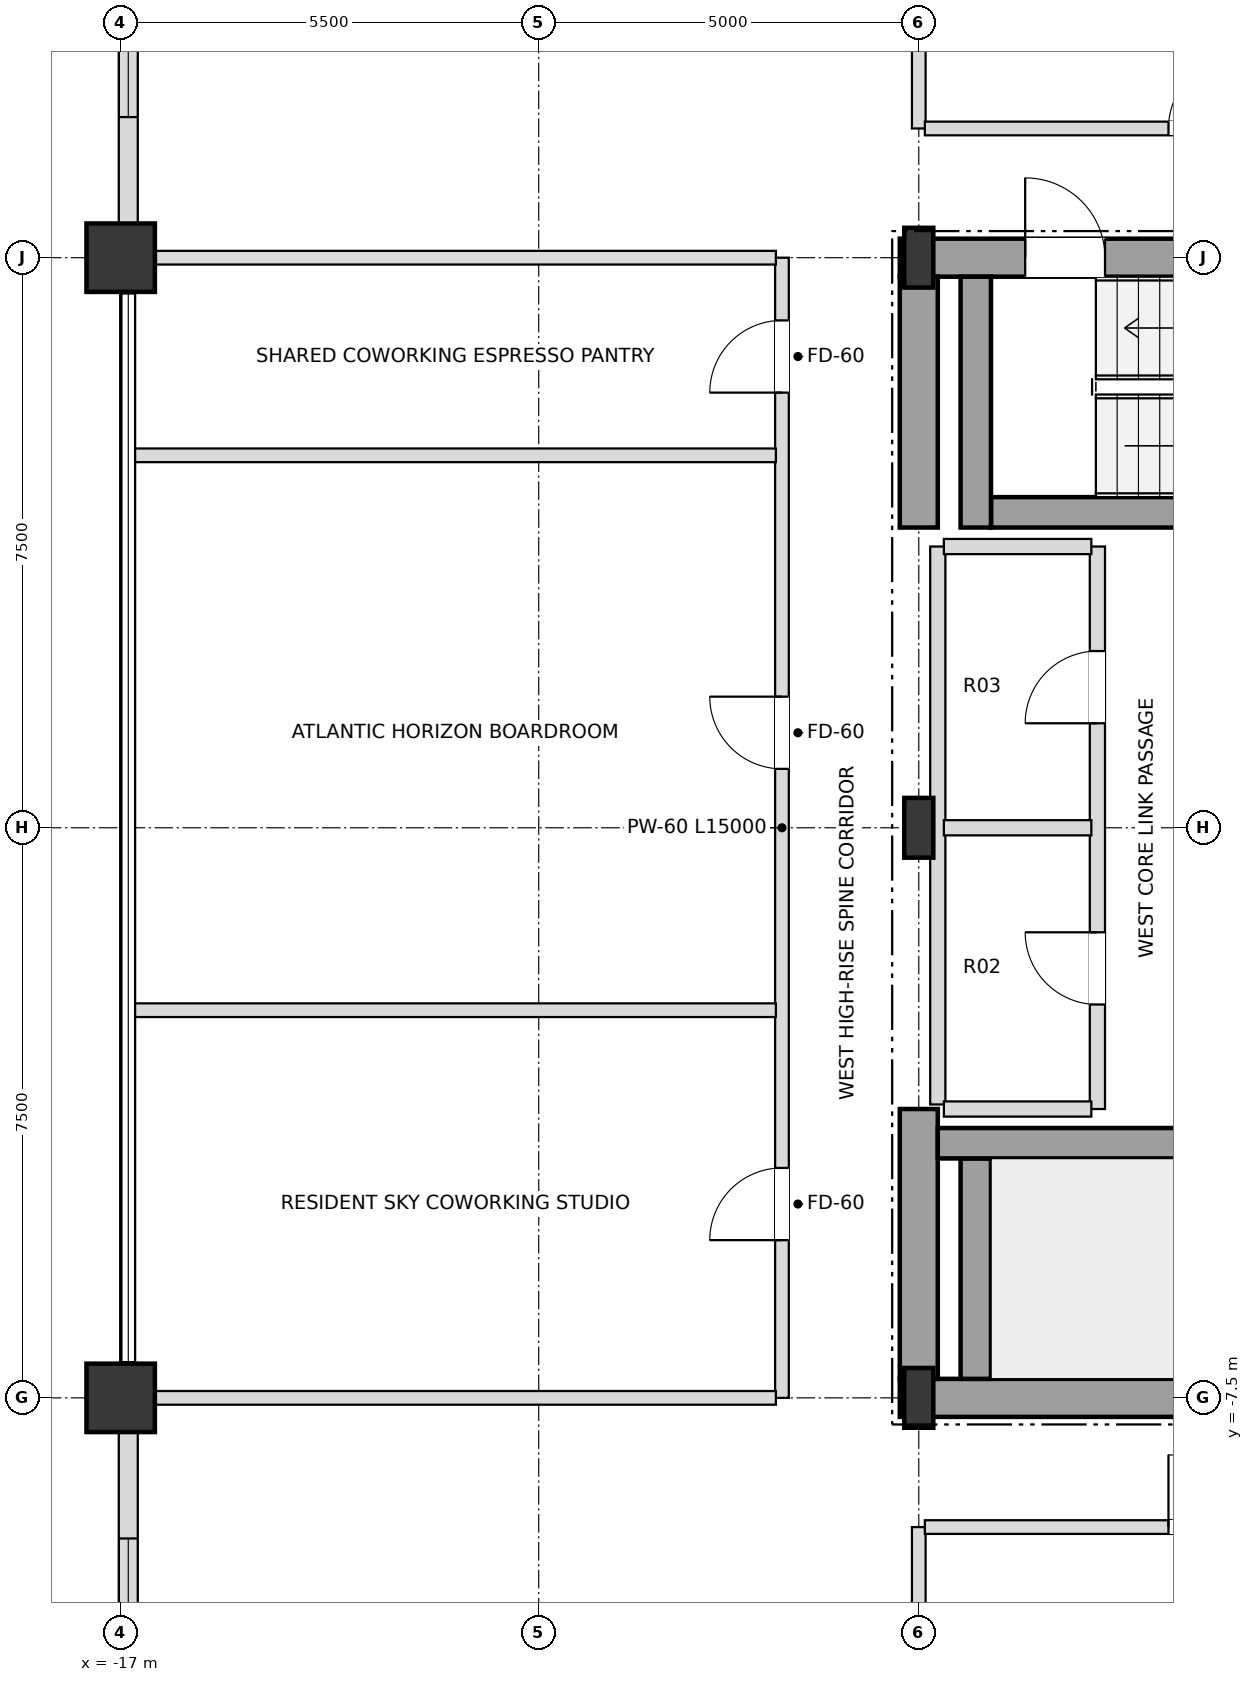
"""IFC4 building model, lengths in metres.
Left out: names, types, materials, properties, quantities, classifications, styles, units other than length and angle.
Written with IfcOpenShell. Run it as: python <this file> out.ifc"""

import sys

from ifc_helpers import new_model, si_unit, direction, frame, frame_2d, origin, origin_2d, place, context, subcontext, project, spatial, rectangle, i_section, extrude, element, fill, save


model = new_model("IFC4")
c1 = context("Model", 3, precision=1e-05, world=origin(), true_north=direction((0.0, 1.0)))
c2 = subcontext(c1, "Body", "Model", "MODEL_VIEW")
j1 = project(units=[si_unit("LENGTHUNIT", "METRE"), si_unit("PLANEANGLEUNIT", "RADIAN")], contexts=[c1])
p1 = place(None, origin())
s1 = spatial("IfcSite", under=j1, at=p1, CompositionType="ELEMENT")
p2 = place(p1, origin())
s2 = spatial("IfcBuilding", under=s1, at=p2, CompositionType="ELEMENT")
p3 = place(p2, frame((0.0, 0.0, 258.3)))
s3 = spatial("IfcBuildingStorey", under=s2, at=p3, CompositionType="ELEMENT", Elevation=258.3)
for number, where, z_axis, x_axis in (
    (1, (-6.5, -7.5, 0.0), (0.0, 0.0, 1.0), (1.0, 0.0, 0.0)),
    (2, (-6.5, 0.0, 0.0), (0.0, 0.0, 1.0), (1.0, 0.0, 0.0)),
    (3, (-6.5, 7.5, 0.0), (0.0, 0.0, 1.0), (1.0, 0.0, 0.0)),
):
    element("IfcColumn", number, at=place(p3, frame(where, z_axis=z_axis, x_axis=x_axis)), inside=s3, PredefinedType="COLUMN", context=c2, shape_type="SweptSolid", body=[
        extrude(i_section(OverallWidth=0.382, OverallDepth=0.786, WebThickness=0.02, FlangeThickness=0.033, at=origin_2d()), origin(), (0.0, 0.0, 1.0), 3.6),
    ])
for number, where, z_axis, x_axis in (
    (4, (-17.0, 7.5, 0.0), (0.0, 0.0, 1.0), (1.0, 0.0, 0.0)),
    (5, (-17.0, -7.5, 0.0), (0.0, 0.0, 1.0), (1.0, 0.0, 0.0)),
):
    element("IfcColumn", number, at=place(p3, frame(where, z_axis=z_axis, x_axis=x_axis)), inside=s3, PredefinedType="USERDEFINED", context=c2, shape_type="SweptSolid", body=[
        extrude(rectangle(XDim=0.9, YDim=0.9, at=origin_2d()), origin(), (0.0, 0.0, 1.0), 3.6),
    ])
p4 = place(p3, frame((-16.9, 12.555, 0.0), z_axis=(0.0, 0.0, 1.0), x_axis=(0.0, -1.0, 0.0)))
e6 = element("IfcWall", 6, at=p4, inside=s3, PredefinedType="SOLIDWALL", context=c2, shape_type="SweptSolid", body=[
    extrude(rectangle(XDim=4.61, YDim=0.25, at=frame_2d((2.305, 0.0))), origin(), (0.0, 0.0, 1.0), 2.748),
])
p5 = place(p4, frame((1.405, 0.0, 0.72)))
e7 = element("IfcOpeningElement", 7, at=p5, cuts=e6, PredefinedType="OPENING", context=c2, shape_type="SweptSolid", body=[
    extrude(rectangle(XDim=1.8, YDim=1.68, at=frame_2d((0.9, 0.84))), frame((0.0, 0.135, 0.0), z_axis=(0.0, -1.0, 0.0), x_axis=(1.0, 0.0, 0.0)), (0.0, 0.0, 1.0), 0.27),
])
p6 = place(p3, frame((-16.9, -7.945, 0.0), z_axis=(0.0, 0.0, 1.0), x_axis=(0.0, -1.0, 0.0)))
e8 = element("IfcWall", 8, at=p6, inside=s3, PredefinedType="SOLIDWALL", context=c2, shape_type="SweptSolid", body=[
    extrude(rectangle(XDim=4.61, YDim=0.25, at=frame_2d((2.305, 0.0))), origin(), (0.0, 0.0, 1.0), 2.748),
])
p7 = place(p6, frame((1.405, 0.0, 0.72)))
e9 = element("IfcOpeningElement", 9, at=p7, cuts=e8, PredefinedType="OPENING", context=c2, shape_type="SweptSolid", body=[
    extrude(rectangle(XDim=1.8, YDim=1.68, at=frame_2d((0.9, 0.84))), frame((0.0, 0.135, 0.0), z_axis=(0.0, -1.0, 0.0), x_axis=(1.0, 0.0, 0.0)), (0.0, 0.0, 1.0), 0.27),
])
p8 = place(p3, frame((-6.75, -7.5, 0.0), z_axis=(0.0, 0.0, 1.0), x_axis=(1.0, 0.0, 0.0)))
e10 = element("IfcWall", 10, at=p8, inside=s3, PredefinedType="SHEAR", context=c2, shape_type="SweptSolid", body=[
    extrude(rectangle(XDim=6.75, YDim=0.5, at=frame_2d((3.375, 0.0))), origin(), (0.0, 0.0, 1.0), 3.38),
])
p9 = place(p3, frame((-6.75, 7.5, 0.0), z_axis=(0.0, 0.0, 1.0), x_axis=(1.0, 0.0, 0.0)))
e11 = element("IfcWall", 11, at=p9, inside=s3, PredefinedType="SHEAR", context=c2, shape_type="SweptSolid", body=[
    extrude(rectangle(XDim=6.75, YDim=0.5, at=frame_2d((3.375, 0.0))), origin(), (0.0, 0.0, 1.0), 3.38),
])
p10 = place(p9, frame((1.65, 0.0, 0.0)))
e12 = element("IfcOpeningElement", 12, at=p10, cuts=e11, PredefinedType="OPENING", context=c2, shape_type="SweptSolid", body=[
    extrude(rectangle(XDim=1.05, YDim=2.15, at=frame_2d((0.525, 1.075))), frame((0.0, 0.26, 0.0), z_axis=(0.0, -1.0, 0.0), x_axis=(1.0, 0.0, 0.0)), (0.0, 0.0, 1.0), 0.52),
])
p11 = place(p3, frame((-6.5, -7.25, 0.0), z_axis=(0.0, 0.0, 1.0), x_axis=(0.0, 1.0, 0.0)))
e13 = element("IfcWall", 13, at=p11, inside=s3, PredefinedType="SHEAR", context=c2, shape_type="SweptSolid", body=[
    extrude(rectangle(XDim=3.55, YDim=0.5, at=frame_2d((1.775, 0.0))), origin(), (0.0, 0.0, 1.0), 3.38),
])
p12 = place(p3, frame((-6.5, 3.95, 0.0), z_axis=(0.0, 0.0, 1.0), x_axis=(0.0, 1.0, 0.0)))
e14 = element("IfcWall", 14, at=p12, inside=s3, PredefinedType="SHEAR", context=c2, shape_type="SweptSolid", body=[
    extrude(rectangle(XDim=3.3, YDim=0.5, at=frame_2d((1.65, 0.0))), origin(), (0.0, 0.0, 1.0), 3.38),
])
p13 = place(p3, frame((-5.75, -7.25, 0.0), z_axis=(0.0, 0.0, 1.0), x_axis=(0.0, 1.0, 0.0)))
e15 = element("IfcWall", 15, at=p13, inside=s3, PredefinedType="SHEAR", context=c2, shape_type="SweptSolid", body=[
    extrude(rectangle(XDim=2.9, YDim=0.4, at=frame_2d((1.45, 0.0))), origin(), (0.0, 0.0, 1.0), 3.38),
])
p14 = place(p3, frame((-6.25, -4.15, 0.0), z_axis=(0.0, 0.0, 1.0), x_axis=(1.0, 0.0, 0.0)))
e16 = element("IfcWall", 16, at=p14, inside=s3, PredefinedType="SHEAR", context=c2, shape_type="SweptSolid", body=[
    extrude(rectangle(XDim=7.78, YDim=0.4, at=frame_2d((3.89, 0.0))), origin(), (0.0, 0.0, 1.0), 3.38),
])
p15 = place(p3, frame((-5.55, 4.15, 0.0), z_axis=(0.0, 0.0, 1.0), x_axis=(1.0, 0.0, 0.0)))
e17 = element("IfcWall", 17, at=p15, inside=s3, PredefinedType="SHEAR", context=c2, shape_type="SweptSolid", body=[
    extrude(rectangle(XDim=7.08, YDim=0.4, at=frame_2d((3.54, 0.0))), origin(), (0.0, 0.0, 1.0), 3.38),
])
p16 = place(p3, frame((-5.75, 3.95, 0.0), z_axis=(0.0, 0.0, 1.0), x_axis=(0.0, 1.0, 0.0)))
e18 = element("IfcWall", 18, at=p16, inside=s3, PredefinedType="SHEAR", context=c2, shape_type="SweptSolid", body=[
    extrude(rectangle(XDim=3.3, YDim=0.4, at=frame_2d((1.65, 0.0))), origin(), (0.0, 0.0, 1.0), 3.38),
])
p17 = place(p3, frame((-8.3, -7.5, 0.0), z_axis=(0.0, 0.0, 1.0), x_axis=(0.0, 1.0, 0.0)))
e19 = element("IfcWall", 19, at=p17, inside=s3, PredefinedType="PARTITIONING", context=c2, shape_type="SweptSolid", body=[
    extrude(rectangle(XDim=15.0, YDim=0.18, at=frame_2d((7.5, 0.0))), origin(), (0.0, 0.0, 1.0), 3.38),
])
p18 = place(p17, frame((2.075, 0.0, 0.0)))
e20 = element("IfcOpeningElement", 20, at=p18, cuts=e19, PredefinedType="OPENING", context=c2, shape_type="SweptSolid", body=[
    extrude(rectangle(XDim=0.95, YDim=2.15, at=frame_2d((0.475, 1.075))), frame((0.0, 0.1, 0.0), z_axis=(0.0, -1.0, 0.0), x_axis=(1.0, 0.0, 0.0)), (0.0, 0.0, 1.0), 0.2),
])
p19 = place(p17, frame((8.275, 0.0, 0.0)))
e21 = element("IfcOpeningElement", 21, at=p19, cuts=e19, PredefinedType="OPENING", context=c2, shape_type="SweptSolid", body=[
    extrude(rectangle(XDim=0.95, YDim=2.15, at=frame_2d((0.475, 1.075))), frame((0.0, 0.1, 0.0), z_axis=(0.0, -1.0, 0.0), x_axis=(1.0, 0.0, 0.0)), (0.0, 0.0, 1.0), 0.2),
])
p20 = place(p17, frame((13.225, 0.0, 0.0)))
e22 = element("IfcOpeningElement", 22, at=p20, cuts=e19, PredefinedType="OPENING", context=c2, shape_type="SweptSolid", body=[
    extrude(rectangle(XDim=0.95, YDim=2.15, at=frame_2d((0.475, 1.075))), frame((0.0, 0.1, 0.0), z_axis=(0.0, -1.0, 0.0), x_axis=(1.0, 0.0, 0.0)), (0.0, 0.0, 1.0), 0.2),
])
for number, where, z_axis, x_axis in (
    (23, (-6.5, -19.9, 0.0), (0.0, 0.0, 1.0), (0.0, 1.0, 0.0)),
    (24, (-6.5, 9.2, 0.0), (0.0, 0.0, 1.0), (0.0, 1.0, 0.0)),
):
    element("IfcWall", number, at=place(p3, frame(where, z_axis=z_axis, x_axis=x_axis)), inside=s3, PredefinedType="PARTITIONING", context=c2, shape_type="SweptSolid", body=[
        extrude(rectangle(XDim=10.7, YDim=0.18, at=frame_2d((5.35, 0.0))), origin(), (0.0, 0.0, 1.0), 2.826),
    ])
p21 = place(p3, frame((-6.25, -3.64, 0.0), z_axis=(0.0, 0.0, 1.0), x_axis=(0.0, 1.0, 0.0)))
e25 = element("IfcWall", 25, at=p21, inside=s3, PredefinedType="SOLIDWALL", context=c2, shape_type="SweptSolid", body=[
    extrude(rectangle(XDim=7.34, YDim=0.2, at=frame_2d((3.67, 0.0))), origin(), (0.0, 0.0, 1.0), 3.38),
])
p22 = place(p3, frame((-4.15, -3.7, 0.0), z_axis=(0.0, 0.0, 1.0), x_axis=(0.0, 1.0, 0.0)))
e26 = element("IfcWall", 26, at=p22, inside=s3, PredefinedType="SOLIDWALL", context=c2, shape_type="SweptSolid", body=[
    extrude(rectangle(XDim=7.4, YDim=0.2, at=frame_2d((3.7, 0.0))), origin(), (0.0, 0.0, 1.0), 3.38),
])
p23 = place(p22, frame((1.375, 0.0, 0.0)))
e27 = element("IfcOpeningElement", 27, at=p23, cuts=e26, PredefinedType="OPENING", context=c2, shape_type="SweptSolid", body=[
    extrude(rectangle(XDim=0.95, YDim=2.15, at=frame_2d((0.475, 1.075))), frame((0.0, 0.11, 0.0), z_axis=(0.0, -1.0, 0.0), x_axis=(1.0, 0.0, 0.0)), (0.0, 0.0, 1.0), 0.22),
])
p24 = place(p22, frame((5.075, 0.0, 0.0)))
e28 = element("IfcOpeningElement", 28, at=p24, cuts=e26, PredefinedType="OPENING", context=c2, shape_type="SweptSolid", body=[
    extrude(rectangle(XDim=0.95, YDim=2.15, at=frame_2d((0.475, 1.075))), frame((0.0, 0.11, 0.0), z_axis=(0.0, -1.0, 0.0), x_axis=(1.0, 0.0, 0.0)), (0.0, 0.0, 1.0), 0.22),
])
p25 = place(p3, frame((-6.42, -9.2, 0.0), z_axis=(0.0, 0.0, 1.0), x_axis=(1.0, 0.0, 0.0)))
e29 = element("IfcWall", 29, at=p25, inside=s3, PredefinedType="PARTITIONING", context=c2, shape_type="SweptSolid", body=[
    extrude(rectangle(XDim=7.34, YDim=0.18, at=frame_2d((3.67, 0.0))), origin(), (0.0, 0.0, 1.0), 3.38),
])
p26 = place(p25, frame((3.205, 0.0, 0.0)))
e30 = element("IfcOpeningElement", 30, at=p26, cuts=e29, PredefinedType="OPENING", context=c2, shape_type="SweptSolid", body=[
    extrude(rectangle(XDim=0.95, YDim=2.15, at=frame_2d((0.475, 1.075))), frame((0.0, 0.1, 0.0), z_axis=(0.0, -1.0, 0.0), x_axis=(1.0, 0.0, 0.0)), (0.0, 0.0, 1.0), 0.2),
])
p27 = place(p3, frame((-16.9, -7.5, 0.0), z_axis=(0.0, 0.0, 1.0), x_axis=(1.0, 0.0, 0.0)))
e31 = element("IfcWall", 31, at=p27, inside=s3, PredefinedType="PARTITIONING", context=c2, shape_type="SweptSolid", body=[
    extrude(rectangle(XDim=8.52, YDim=0.18, at=frame_2d((4.26, 0.0))), origin(), (0.0, 0.0, 1.0), 2.826),
])
p28 = place(p3, frame((-6.17, -3.7, 0.0), z_axis=(0.0, 0.0, 1.0), x_axis=(1.0, 0.0, 0.0)))
e32 = element("IfcWall", 32, at=p28, inside=s3, PredefinedType="SOLIDWALL", context=c2, shape_type="SweptSolid", body=[
    extrude(rectangle(XDim=1.94, YDim=0.2, at=frame_2d((0.97, 0.0))), origin(), (0.0, 0.0, 1.0), 3.38),
])
p29 = place(p3, frame((-16.82, -2.4, 0.0), z_axis=(0.0, 0.0, 1.0), x_axis=(1.0, 0.0, 0.0)))
e33 = element("IfcWall", 33, at=p29, inside=s3, PredefinedType="PARTITIONING", context=c2, shape_type="SweptSolid", body=[
    extrude(rectangle(XDim=8.44, YDim=0.18, at=frame_2d((4.22, 0.0))), origin(), (0.0, 0.0, 1.0), 3.018),
])
for number, where, z_axis, x_axis in (
    (34, (-6.17, 0.0, 0.0), (0.0, 0.0, 1.0), (1.0, 0.0, 0.0)),
    (35, (-6.17, 3.7, 0.0), (0.0, 0.0, 1.0), (1.0, 0.0, 0.0)),
):
    element("IfcWall", number, at=place(p3, frame(where, z_axis=z_axis, x_axis=x_axis)), inside=s3, PredefinedType="SOLIDWALL", context=c2, shape_type="SweptSolid", body=[
        extrude(rectangle(XDim=1.94, YDim=0.2, at=frame_2d((0.97, 0.0))), origin(), (0.0, 0.0, 1.0), 3.38),
    ])
p30 = place(p3, frame((-16.82, 4.9, 0.0), z_axis=(0.0, 0.0, 1.0), x_axis=(1.0, 0.0, 0.0)))
e36 = element("IfcWall", 36, at=p30, inside=s3, PredefinedType="PARTITIONING", context=c2, shape_type="SweptSolid", body=[
    extrude(rectangle(XDim=8.44, YDim=0.18, at=frame_2d((4.22, 0.0))), origin(), (0.0, 0.0, 1.0), 3.018),
])
p31 = place(p3, frame((-16.9, 7.5, 0.0), z_axis=(0.0, 0.0, 1.0), x_axis=(1.0, 0.0, 0.0)))
e37 = element("IfcWall", 37, at=p31, inside=s3, PredefinedType="PARTITIONING", context=c2, shape_type="SweptSolid", body=[
    extrude(rectangle(XDim=8.52, YDim=0.18, at=frame_2d((4.26, 0.0))), origin(), (0.0, 0.0, 1.0), 2.826),
])
p32 = place(p3, frame((-6.42, 9.2, 0.0), z_axis=(0.0, 0.0, 1.0), x_axis=(1.0, 0.0, 0.0)))
e38 = element("IfcWall", 38, at=p32, inside=s3, PredefinedType="PARTITIONING", context=c2, shape_type="SweptSolid", body=[
    extrude(rectangle(XDim=7.34, YDim=0.18, at=frame_2d((3.67, 0.0))), origin(), (0.0, 0.0, 1.0), 3.38),
])
p33 = place(p32, frame((3.205, 0.0, 0.0)))
e39 = element("IfcOpeningElement", 39, at=p33, cuts=e38, PredefinedType="OPENING", context=c2, shape_type="SweptSolid", body=[
    extrude(rectangle(XDim=0.95, YDim=2.15, at=frame_2d((0.475, 1.075))), frame((0.0, 0.1, 0.0), z_axis=(0.0, -1.0, 0.0), x_axis=(1.0, 0.0, 0.0)), (0.0, 0.0, 1.0), 0.2),
])
p34 = place(p5, origin())
e40 = element("IfcWindow", 40, at=p34, inside=s3, PartitioningType="SINGLE_PANEL", PredefinedType="WINDOW", context=c2, shape_type="SweptSolid", body=[
    extrude(rectangle(XDim=1.8, YDim=1.68, at=frame_2d((0.9, 0.84))), frame((0.0, 0.03, 0.0), z_axis=(0.0, -1.0, 0.0), x_axis=(1.0, 0.0, 0.0)), (0.0, 0.0, 1.0), 0.06),
])
fill(e7, e40)
p35 = place(p7, origin())
e41 = element("IfcWindow", 41, at=p35, inside=s3, PartitioningType="SINGLE_PANEL", PredefinedType="WINDOW", context=c2, shape_type="SweptSolid", body=[
    extrude(rectangle(XDim=1.8, YDim=1.68, at=frame_2d((0.9, 0.84))), frame((0.0, 0.03, 0.0), z_axis=(0.0, -1.0, 0.0), x_axis=(1.0, 0.0, 0.0)), (0.0, 0.0, 1.0), 0.06),
])
fill(e9, e41)
p36 = place(p10, origin())
e42 = element("IfcDoor", 42, at=p36, inside=s3, OperationType="SINGLE_SWING_LEFT", PredefinedType="DOOR", context=c2, shape_type="SweptSolid", body=[
    extrude(rectangle(XDim=1.05, YDim=2.15, at=frame_2d((0.525, 1.075))), frame((0.0, 0.025, 0.0), z_axis=(0.0, -1.0, 0.0), x_axis=(1.0, 0.0, 0.0)), (0.0, 0.0, 1.0), 0.05),
])
fill(e12, e42)
p37 = place(p23, origin())
e43 = element("IfcDoor", 43, at=p37, inside=s3, OperationType="SINGLE_SWING_RIGHT", PredefinedType="DOOR", context=c2, shape_type="SweptSolid", body=[
    extrude(rectangle(XDim=0.95, YDim=2.15, at=frame_2d((0.475, 1.075))), frame((0.0, 0.025, 0.0), z_axis=(0.0, -1.0, 0.0), x_axis=(1.0, 0.0, 0.0)), (0.0, 0.0, 1.0), 0.05),
])
fill(e27, e43)
p38 = place(p24, origin())
e44 = element("IfcDoor", 44, at=p38, inside=s3, OperationType="SINGLE_SWING_LEFT", PredefinedType="DOOR", context=c2, shape_type="SweptSolid", body=[
    extrude(rectangle(XDim=0.95, YDim=2.15, at=frame_2d((0.475, 1.075))), frame((0.0, 0.025, 0.0), z_axis=(0.0, -1.0, 0.0), x_axis=(1.0, 0.0, 0.0)), (0.0, 0.0, 1.0), 0.05),
])
fill(e28, e44)
p39 = place(p26, origin())
e45 = element("IfcDoor", 45, at=p39, inside=s3, OperationType="SINGLE_SWING_LEFT", PredefinedType="DOOR", context=c2, shape_type="SweptSolid", body=[
    extrude(rectangle(XDim=0.95, YDim=2.15, at=frame_2d((0.475, 1.075))), frame((0.0, 0.025, 0.0), z_axis=(0.0, -1.0, 0.0), x_axis=(1.0, 0.0, 0.0)), (0.0, 0.0, 1.0), 0.05),
])
fill(e30, e45)
p40 = place(p33, origin())
e46 = element("IfcDoor", 46, at=p40, inside=s3, OperationType="SINGLE_SWING_RIGHT", PredefinedType="DOOR", context=c2, shape_type="SweptSolid", body=[
    extrude(rectangle(XDim=0.95, YDim=2.15, at=frame_2d((0.475, 1.075))), frame((0.0, 0.025, 0.0), z_axis=(0.0, -1.0, 0.0), x_axis=(1.0, 0.0, 0.0)), (0.0, 0.0, 1.0), 0.05),
])
fill(e39, e46)
p41 = place(p18, origin())
e47 = element("IfcDoor", 47, at=p41, inside=s3, OperationType="SINGLE_SWING_LEFT", PredefinedType="DOOR", context=c2, shape_type="SweptSolid", body=[
    extrude(rectangle(XDim=0.95, YDim=2.15, at=frame_2d((0.475, 1.075))), frame((0.0, 0.025, 0.0), z_axis=(0.0, -1.0, 0.0), x_axis=(1.0, 0.0, 0.0)), (0.0, 0.0, 1.0), 0.05),
])
fill(e20, e47)
p42 = place(p19, origin())
e48 = element("IfcDoor", 48, at=p42, inside=s3, OperationType="SINGLE_SWING_RIGHT", PredefinedType="DOOR", context=c2, shape_type="SweptSolid", body=[
    extrude(rectangle(XDim=0.95, YDim=2.15, at=frame_2d((0.475, 1.075))), frame((0.0, 0.025, 0.0), z_axis=(0.0, -1.0, 0.0), x_axis=(1.0, 0.0, 0.0)), (0.0, 0.0, 1.0), 0.05),
])
fill(e21, e48)
p43 = place(p20, origin())
e49 = element("IfcDoor", 49, at=p43, inside=s3, OperationType="SINGLE_SWING_LEFT", PredefinedType="DOOR", context=c2, shape_type="SweptSolid", body=[
    extrude(rectangle(XDim=0.95, YDim=2.15, at=frame_2d((0.475, 1.075))), frame((0.0, 0.025, 0.0), z_axis=(0.0, -1.0, 0.0), x_axis=(1.0, 0.0, 0.0)), (0.0, 0.0, 1.0), 0.05),
])
fill(e22, e49)
save(model, sys.argv[1])
